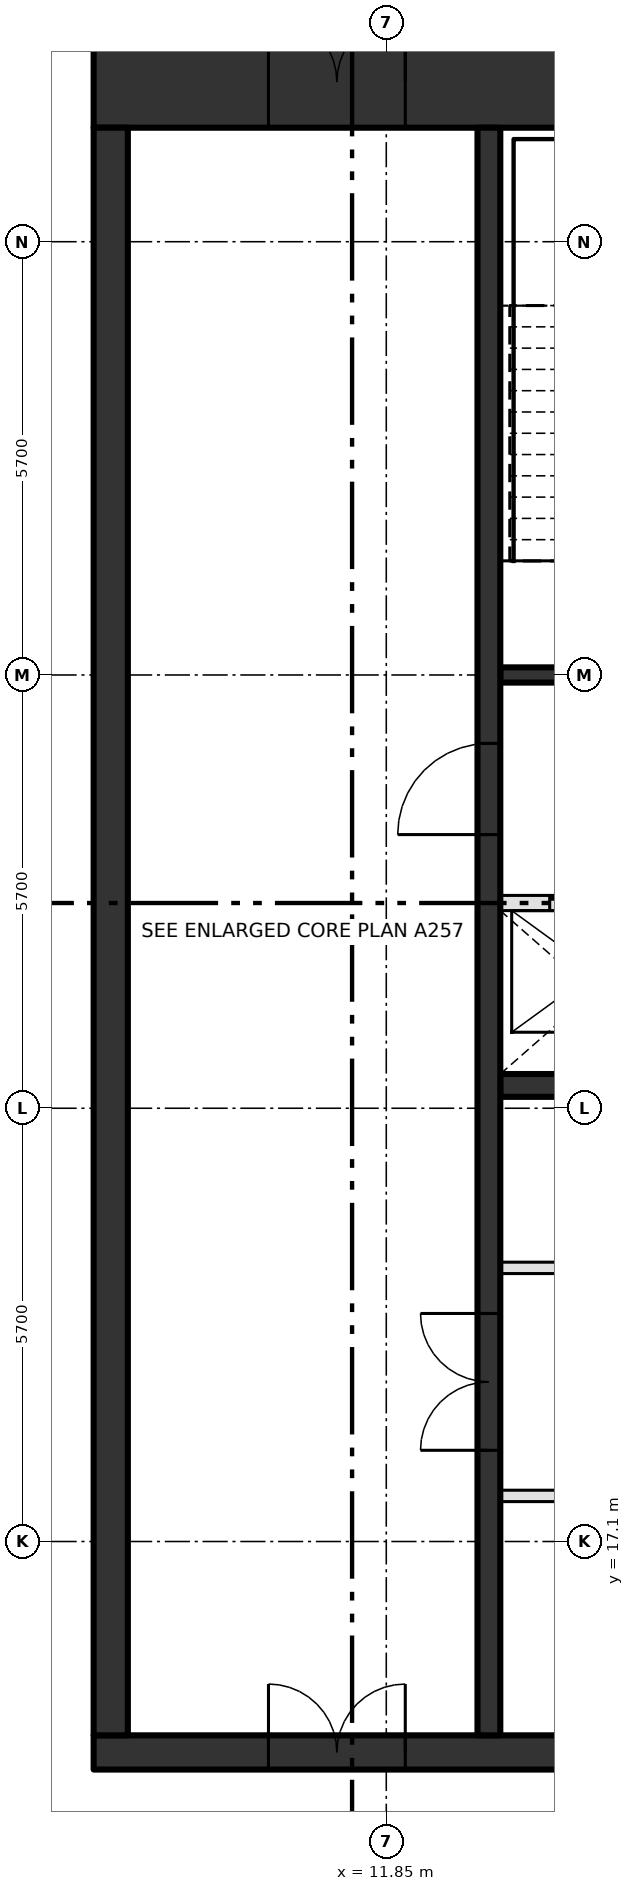
"""IFC4 building model, lengths in metres.
Left out: names, types, materials, properties, quantities, classifications, styles, units other than length and angle.
Written with IfcOpenShell. Run it as: python <this file> out.ifc"""

import sys

from ifc_helpers import new_model, si_unit, direction, frame, frame_2d, origin, place, context, subcontext, project, spatial, rectangle, extrude, element, fill, save


model = new_model("IFC4")
c1 = context("Model", 3, precision=1e-05, world=origin(), true_north=direction((0.0, 1.0)))
c2 = subcontext(c1, "Body", "Model", "MODEL_VIEW")
j1 = project(units=[si_unit("LENGTHUNIT", "METRE"), si_unit("PLANEANGLEUNIT", "RADIAN")], contexts=[c1])
p1 = place(None, origin())
s1 = spatial("IfcSite", under=j1, at=p1, CompositionType="ELEMENT")
p2 = place(p1, origin())
s2 = spatial("IfcBuilding", under=s1, at=p2, CompositionType="ELEMENT")
p3 = place(p2, frame((0.0, 0.0, 414.6)))
s3 = spatial("IfcBuildingStorey", under=s2, at=p3, CompositionType="ELEMENT", Elevation=414.6)
p4 = place(p3, frame((8.0, 14.325, -0.3), z_axis=(0.0, 0.0, 1.0), x_axis=(1.0, 0.0, 0.0)))
e1 = element("IfcWall", 1, at=p4, inside=s3, PredefinedType="SHEAR", context=c2, shape_type="SweptSolid", body=[
    extrude(rectangle(XDim=22.8, YDim=0.45, at=frame_2d((11.4, 0.0))), origin(), (0.0, 0.0, 1.0), 4.65),
])
p5 = place(p4, frame((2.3, 0.0, 0.3)))
e2 = element("IfcOpeningElement", 2, at=p5, cuts=e1, PredefinedType="OPENING", context=c2, shape_type="SweptSolid", body=[
    extrude(rectangle(XDim=1.8, YDim=2.1, at=frame_2d((0.9, 1.05))), frame((0.0, 0.235, 0.0), z_axis=(0.0, -1.0, 0.0), x_axis=(1.0, 0.0, 0.0)), (0.0, 0.0, 1.0), 0.47),
])
p6 = place(p3, frame((8.0, 36.3, -0.3), z_axis=(0.0, 0.0, 1.0), x_axis=(1.0, 0.0, 0.0)))
e3 = element("IfcWall", 3, at=p6, inside=s3, PredefinedType="SHEAR", context=c2, shape_type="SweptSolid", body=[
    extrude(rectangle(XDim=22.8, YDim=1.2, at=frame_2d((11.4, 0.0))), origin(), (0.0, 0.0, 1.0), 4.65),
])
p7 = place(p6, frame((2.3, 0.0, 0.3)))
e4 = element("IfcOpeningElement", 4, at=p7, cuts=e3, PredefinedType="OPENING", context=c2, shape_type="SweptSolid", body=[
    extrude(rectangle(XDim=1.8, YDim=2.1, at=frame_2d((0.9, 1.05))), frame((0.0, 0.61, 0.0), z_axis=(0.0, -1.0, 0.0), x_axis=(1.0, 0.0, 0.0)), (0.0, 0.0, 1.0), 1.22),
])
p8 = place(p3, frame((8.225, 14.55, -0.3), z_axis=(0.0, 0.0, 1.0), x_axis=(0.0, 1.0, 0.0)))
e5 = element("IfcWall", 5, at=p8, inside=s3, PredefinedType="SHEAR", context=c2, shape_type="SweptSolid", body=[
    extrude(rectangle(XDim=21.15, YDim=0.45, at=frame_2d((10.575, 0.0))), origin(), (0.0, 0.0, 1.0), 4.65),
])
p9 = place(p3, frame((13.35, 17.7, 0.0), z_axis=(0.0, 0.0, 1.0), x_axis=(1.0, 0.0, 0.0)))
e6 = element("IfcWall", 6, at=p9, inside=s3, PredefinedType="PARTITIONING", context=c2, shape_type="SweptSolid", body=[
    extrude(rectangle(XDim=13.425, YDim=0.15, at=frame_2d((6.712, 0.0))), origin(), (0.0, 0.0, 1.0), 4.35),
])
p10 = place(p9, frame((0.75, 0.0, 0.0)))
e7 = element("IfcOpeningElement", 7, at=p10, cuts=e6, PredefinedType="OPENING", context=c2, shape_type="SweptSolid", body=[
    extrude(rectangle(XDim=0.9, YDim=2.1, at=frame_2d((0.45, 1.05))), frame((0.0, 0.085, 0.0), z_axis=(0.0, -1.0, 0.0), x_axis=(1.0, 0.0, 0.0)), (0.0, 0.0, 1.0), 0.17),
])
p11 = place(p9, frame((7.5, 0.0, 0.0)))
e8 = element("IfcOpeningElement", 8, at=p11, cuts=e6, PredefinedType="OPENING", context=c2, shape_type="SweptSolid", body=[
    extrude(rectangle(XDim=0.9, YDim=2.1, at=frame_2d((0.45, 1.05))), frame((0.0, 0.085, 0.0), z_axis=(0.0, -1.0, 0.0), x_axis=(1.0, 0.0, 0.0)), (0.0, 0.0, 1.0), 0.17),
])
p12 = place(p3, frame((13.35, 20.7, 0.0), z_axis=(0.0, 0.0, 1.0), x_axis=(1.0, 0.0, 0.0)))
e9 = element("IfcWall", 9, at=p12, inside=s3, PredefinedType="PARTITIONING", context=c2, shape_type="SweptSolid", body=[
    extrude(rectangle(XDim=13.425, YDim=0.15, at=frame_2d((6.712, 0.0))), origin(), (0.0, 0.0, 1.0), 4.35),
])
p13 = place(p12, frame((2.1, 0.0, 0.0)))
e10 = element("IfcOpeningElement", 10, at=p13, cuts=e9, PredefinedType="OPENING", context=c2, shape_type="SweptSolid", body=[
    extrude(rectangle(XDim=0.9, YDim=2.1, at=frame_2d((0.45, 1.05))), frame((0.0, 0.085, 0.0), z_axis=(0.0, -1.0, 0.0), x_axis=(1.0, 0.0, 0.0)), (0.0, 0.0, 1.0), 0.17),
])
p14 = place(p12, frame((8.85, 0.0, 0.0)))
e11 = element("IfcOpeningElement", 11, at=p14, cuts=e9, PredefinedType="OPENING", context=c2, shape_type="SweptSolid", body=[
    extrude(rectangle(XDim=0.9, YDim=2.1, at=frame_2d((0.45, 1.05))), frame((0.0, 0.085, 0.0), z_axis=(0.0, -1.0, 0.0), x_axis=(1.0, 0.0, 0.0)), (0.0, 0.0, 1.0), 0.17),
])
p15 = place(p3, frame((13.35, 23.1, 0.0), z_axis=(0.0, 0.0, 1.0), x_axis=(1.0, 0.0, 0.0)))
e12 = element("IfcWall", 12, at=p15, inside=s3, PredefinedType="SHEAR", context=c2, shape_type="SweptSolid", body=[
    extrude(rectangle(XDim=17.0, YDim=0.3, at=frame_2d((8.5, 0.0))), origin(), (0.0, 0.0, 1.0), 4.35),
])
p16 = place(p3, frame((13.35, 25.5, 0.0), z_axis=(0.0, 0.0, 1.0), x_axis=(1.0, 0.0, 0.0)))
e13 = element("IfcWall", 13, at=p16, inside=s3, PredefinedType="SOLIDWALL", context=c2, shape_type="SweptSolid", body=[
    extrude(rectangle(XDim=17.0, YDim=0.2, at=frame_2d((8.5, 0.0))), origin(), (0.0, 0.0, 1.0), 4.35),
])
p17 = place(p16, frame((0.65, 0.0, 0.0)))
e14 = element("IfcOpeningElement", 14, at=p17, cuts=e13, PredefinedType="OPENING", context=c2, shape_type="SweptSolid", body=[
    extrude(rectangle(XDim=1.1, YDim=2.1, at=frame_2d((0.55, 1.05))), frame((0.0, 0.11, 0.0), z_axis=(0.0, -1.0, 0.0), x_axis=(1.0, 0.0, 0.0)), (0.0, 0.0, 1.0), 0.22),
])
p18 = place(p16, frame((3.35, 0.0, 0.0)))
e15 = element("IfcOpeningElement", 15, at=p18, cuts=e13, PredefinedType="OPENING", context=c2, shape_type="SweptSolid", body=[
    extrude(rectangle(XDim=1.1, YDim=2.1, at=frame_2d((0.55, 1.05))), frame((0.0, 0.11, 0.0), z_axis=(0.0, -1.0, 0.0), x_axis=(1.0, 0.0, 0.0)), (0.0, 0.0, 1.0), 0.22),
])
p19 = place(p16, frame((6.05, 0.0, 0.0)))
e16 = element("IfcOpeningElement", 16, at=p19, cuts=e13, PredefinedType="OPENING", context=c2, shape_type="SweptSolid", body=[
    extrude(rectangle(XDim=1.1, YDim=2.1, at=frame_2d((0.55, 1.05))), frame((0.0, 0.11, 0.0), z_axis=(0.0, -1.0, 0.0), x_axis=(1.0, 0.0, 0.0)), (0.0, 0.0, 1.0), 0.22),
])
p20 = place(p16, frame((8.75, 0.0, 0.0)))
e17 = element("IfcOpeningElement", 17, at=p20, cuts=e13, PredefinedType="OPENING", context=c2, shape_type="SweptSolid", body=[
    extrude(rectangle(XDim=1.1, YDim=2.1, at=frame_2d((0.55, 1.05))), frame((0.0, 0.11, 0.0), z_axis=(0.0, -1.0, 0.0), x_axis=(1.0, 0.0, 0.0)), (0.0, 0.0, 1.0), 0.22),
])
p21 = place(p16, frame((13.0, 0.0, 0.0)))
e18 = element("IfcOpeningElement", 18, at=p21, cuts=e13, PredefinedType="OPENING", context=c2, shape_type="SweptSolid", body=[
    extrude(rectangle(XDim=0.9, YDim=2.1, at=frame_2d((0.45, 1.05))), frame((0.0, 0.11, 0.0), z_axis=(0.0, -1.0, 0.0), x_axis=(1.0, 0.0, 0.0)), (0.0, 0.0, 1.0), 0.22),
])
p22 = place(p3, frame((13.35, 28.5, 0.0), z_axis=(0.0, 0.0, 1.0), x_axis=(1.0, 0.0, 0.0)))
e19 = element("IfcWall", 19, at=p22, inside=s3, PredefinedType="SOLIDWALL", context=c2, shape_type="SweptSolid", body=[
    extrude(rectangle(XDim=6.75, YDim=0.2, at=frame_2d((3.375, 0.0))), origin(), (0.0, 0.0, 1.0), 4.35),
])
p23 = place(p22, frame((0.95, 0.0, 0.0)))
e20 = element("IfcOpeningElement", 20, at=p23, cuts=e19, PredefinedType="OPENING", context=c2, shape_type="SweptSolid", body=[
    extrude(rectangle(XDim=1.2, YDim=2.1, at=frame_2d((0.6, 1.05))), frame((0.0, 0.11, 0.0), z_axis=(0.0, -1.0, 0.0), x_axis=(1.0, 0.0, 0.0)), (0.0, 0.0, 1.0), 0.22),
])
p24 = place(p22, frame((3.75, 0.0, 0.0)))
e21 = element("IfcOpeningElement", 21, at=p24, cuts=e19, PredefinedType="OPENING", context=c2, shape_type="SweptSolid", body=[
    extrude(rectangle(XDim=1.1, YDim=2.1, at=frame_2d((0.55, 1.05))), frame((0.0, 0.11, 0.0), z_axis=(0.0, -1.0, 0.0), x_axis=(1.0, 0.0, 0.0)), (0.0, 0.0, 1.0), 0.22),
])
p25 = place(p3, frame((13.2, 14.55, 0.0), z_axis=(0.0, 0.0, 1.0), x_axis=(0.0, 1.0, 0.0)))
e22 = element("IfcWall", 22, at=p25, inside=s3, PredefinedType="SHEAR", context=c2, shape_type="SweptSolid", body=[
    extrude(rectangle(XDim=21.15, YDim=0.3, at=frame_2d((10.575, 0.0))), origin(), (0.0, 0.0, 1.0), 4.35),
])
p26 = place(p25, frame((3.75, 0.0, 0.0)))
e23 = element("IfcOpeningElement", 23, at=p26, cuts=e22, PredefinedType="OPENING", context=c2, shape_type="SweptSolid", body=[
    extrude(rectangle(XDim=1.8, YDim=2.1, at=frame_2d((0.9, 1.05))), frame((0.0, 0.16, 0.0), z_axis=(0.0, -1.0, 0.0), x_axis=(1.0, 0.0, 0.0)), (0.0, 0.0, 1.0), 0.32),
])
p27 = place(p25, frame((11.85, 0.0, 0.0)))
e24 = element("IfcOpeningElement", 24, at=p27, cuts=e22, PredefinedType="OPENING", context=c2, shape_type="SweptSolid", body=[
    extrude(rectangle(XDim=1.2, YDim=2.1, at=frame_2d((0.6, 1.05))), frame((0.0, 0.16, 0.0), z_axis=(0.0, -1.0, 0.0), x_axis=(1.0, 0.0, 0.0)), (0.0, 0.0, 1.0), 0.32),
])
p28 = place(p17, origin())
e25 = element("IfcDoor", 25, at=p28, inside=s3, OperationType="SLIDING_TO_LEFT", PredefinedType="DOOR", context=c2, shape_type="SweptSolid", body=[
    extrude(rectangle(XDim=1.1, YDim=2.1, at=frame_2d((0.55, 1.05))), frame((0.0, 0.025, 0.0), z_axis=(0.0, -1.0, 0.0), x_axis=(1.0, 0.0, 0.0)), (0.0, 0.0, 1.0), 0.05),
])
fill(e14, e25)
p29 = place(p26, origin())
e26 = element("IfcDoor", 26, at=p29, inside=s3, OperationType="DOUBLE_DOOR_SINGLE_SWING", PredefinedType="DOOR", context=c2, shape_type="SweptSolid", body=[
    extrude(rectangle(XDim=1.8, YDim=2.1, at=frame_2d((0.9, 1.05))), frame((0.0, 0.025, 0.0), z_axis=(0.0, -1.0, 0.0), x_axis=(1.0, 0.0, 0.0)), (0.0, 0.0, 1.0), 0.05),
])
fill(e23, e26)
p30 = place(p27, origin())
e27 = element("IfcDoor", 27, at=p30, inside=s3, OperationType="SINGLE_SWING_LEFT", PredefinedType="DOOR", context=c2, shape_type="SweptSolid", body=[
    extrude(rectangle(XDim=1.2, YDim=2.1, at=frame_2d((0.6, 1.05))), frame((0.0, 0.025, 0.0), z_axis=(0.0, -1.0, 0.0), x_axis=(1.0, 0.0, 0.0)), (0.0, 0.0, 1.0), 0.05),
])
fill(e24, e27)
p31 = place(p7, origin())
e28 = element("IfcDoor", 28, at=p31, inside=s3, OperationType="DOUBLE_DOOR_SINGLE_SWING", PredefinedType="DOOR", context=c2, shape_type="SweptSolid", body=[
    extrude(rectangle(XDim=1.8, YDim=2.1, at=frame_2d((0.9, 1.05))), frame((0.0, 0.025, 0.0), z_axis=(0.0, -1.0, 0.0), x_axis=(1.0, 0.0, 0.0)), (0.0, 0.0, 1.0), 0.05),
])
fill(e4, e28)
p32 = place(p5, origin())
e29 = element("IfcDoor", 29, at=p32, inside=s3, OperationType="DOUBLE_DOOR_SINGLE_SWING", PredefinedType="DOOR", context=c2, shape_type="SweptSolid", body=[
    extrude(rectangle(XDim=1.8, YDim=2.1, at=frame_2d((0.9, 1.05))), frame((0.0, 0.025, 0.0), z_axis=(0.0, -1.0, 0.0), x_axis=(1.0, 0.0, 0.0)), (0.0, 0.0, 1.0), 0.05),
])
fill(e2, e29)
save(model, sys.argv[1])
